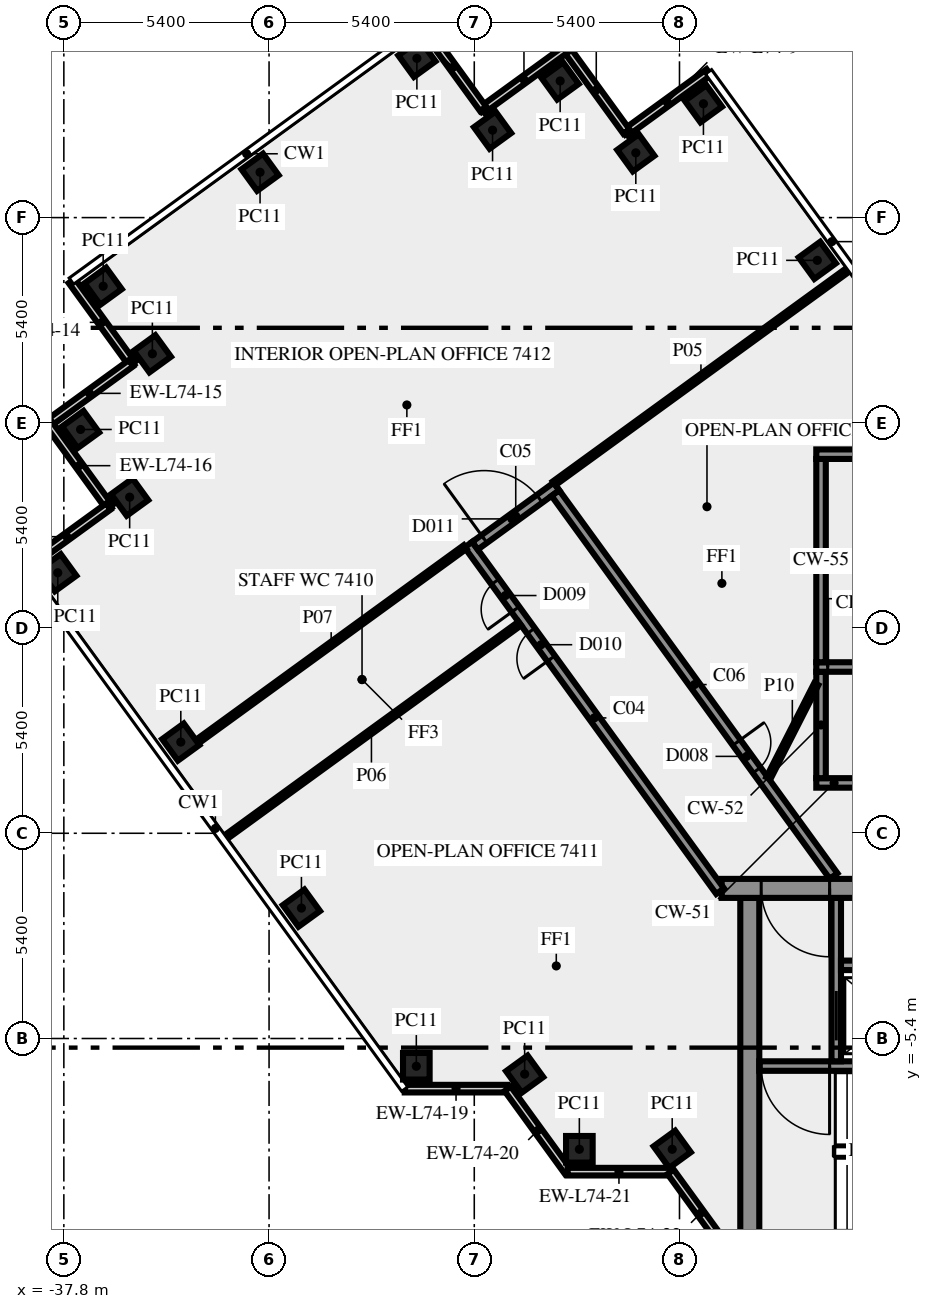
"""IFC4 building model, lengths in metres.
Left out: names, types, materials, properties, quantities, classifications, styles, units other than length and angle.
Written with IfcOpenShell. Run it as: python <this file> out.ifc"""

import sys

from ifc_helpers import new_model, si_unit, direction, frame, frame_2d, origin, origin_2d, place, context, subcontext, project, spatial, rectangle, extrude, element, fill, save


model = new_model("IFC4")
c1 = context("Model", 3, precision=1e-05, world=origin(), true_north=direction((0.0, 1.0)))
c2 = subcontext(c1, "Body", "Model", "MODEL_VIEW")
j1 = project(units=[si_unit("LENGTHUNIT", "METRE"), si_unit("PLANEANGLEUNIT", "RADIAN")], contexts=[c1])
p1 = place(None, origin())
s1 = spatial("IfcSite", under=j1, at=p1, CompositionType="ELEMENT")
p2 = place(p1, origin())
s2 = spatial("IfcBuilding", under=s1, at=p2, CompositionType="ELEMENT")
p3 = place(p2, frame((0.0, 0.0, 319.0)))
s3 = spatial("IfcBuildingStorey", under=s2, at=p3, CompositionType="ELEMENT", Elevation=319.0)
for number, where, z_axis, x_axis in (
    (1, (-17.974, 15.075, 0.0), (0.0, 0.0, 1.0), (-0.588, 0.809, 0.0)),
    (2, (-20.97, 19.195, 0.0), (0.0, 0.0, 1.0), (-0.588, 0.809, 0.0)),
    (3, (-22.749, 17.904, 0.0), (0.0, 0.0, 1.0), (-0.588, 0.809, 0.0)),
    (4, (-24.74, 19.795, 0.0), (0.0, 0.0, 1.0), (-0.588, 0.809, 0.0)),
    (5, (-26.519, 18.5, 0.0), (0.0, 0.0, 1.0), (-0.588, 0.809, 0.0)),
    (6, (-28.51, 20.39, 0.0), (0.0, 0.0, 1.0), (-0.809, -0.588, 0.0)),
    (7, (-32.637, 17.393, 0.0), (0.0, 0.0, 1.0), (-0.809, -0.588, 0.0)),
    (8, (-36.765, 14.395, 0.0), (0.0, 0.0, 1.0), (0.588, -0.809, 0.0)),
    (9, (-35.471, 12.616, 0.0), (0.0, 0.0, 1.0), (-0.809, -0.588, 0.0)),
    (10, (-37.36, 10.625, 0.0), (0.0, 0.0, 1.0), (0.588, -0.809, 0.0)),
    (11, (-36.068, 8.844, 0.0), (0.0, 0.0, 1.0), (0.588, -0.809, 0.0)),
    (12, (-37.96, 6.855, 0.0), (0.0, 0.0, 1.0), (0.588, -0.809, 0.0)),
    (13, (-34.722, 2.4, 0.0), (0.0, 0.0, 1.0), (0.588, -0.809, 0.0)),
    (14, (-31.548, -1.969, 0.0), (0.0, 0.0, 1.0), (0.588, -0.809, 0.0)),
    (15, (-28.525, -6.13, 0.0), (0.0, 0.0, 1.0), (1.0, 0.0, 0.0)),
    (16, (-25.674, -6.337, 0.0), (0.0, 0.0, 1.0), (0.588, -0.809, 0.0)),
    (17, (-24.235, -8.315, 0.0), (0.0, 0.0, 1.0), (1.0, 0.0, 0.0)),
    (18, (-21.792, -8.315, 0.0), (0.0, 0.0, 1.0), (0.588, -0.809, 0.0)),
):
    element("IfcColumn", number, at=place(p3, frame(where, z_axis=z_axis, x_axis=x_axis)), inside=s3, PredefinedType="COLUMN", context=c2, shape_type="SweptSolid", body=[
        extrude(rectangle(XDim=0.7, YDim=0.7, at=origin_2d()), origin(), (0.0, 0.0, 1.0), 3.65),
    ])
for number, where, z_axis, x_axis in (
    (19, (-20.829, 20.025, 0.0), (0.0, 0.0, 1.0), (-0.809, -0.588, 0.0)),
    (20, (-22.996, 18.466, 0.0), (0.0, 0.0, 1.0), (-0.588, 0.809, 0.0)),
):
    element("IfcWall", number, at=place(p3, frame(where, z_axis=z_axis, x_axis=x_axis)), inside=s3, PredefinedType="SOLIDWALL", context=c2, shape_type="SweptSolid", body=[
        extrude(rectangle(XDim=2.7, YDim=0.2, at=frame_2d((1.35, 0.0))), origin(), (0.0, 0.0, 1.0), 3.65),
    ])
for number, where, z_axis, x_axis in (
    (21, (-24.6, 20.623, 0.0), (0.0, 0.0, 1.0), (-0.809, -0.588, 0.0)),
    (22, (-26.768, 19.063, 0.0), (0.0, 0.0, 1.0), (-0.588, 0.809, 0.0)),
):
    element("IfcWall", number, at=place(p3, frame(where, z_axis=z_axis, x_axis=x_axis)), inside=s3, PredefinedType="SOLIDWALL", context=c2, shape_type="SweptSolid", body=[
        extrude(rectangle(XDim=2.7, YDim=0.2, at=frame_2d((1.35, 0.0))), origin(), (0.0, 0.0, 1.0), 3.65),
    ])
for number, where, z_axis, x_axis in (
    (23, (-37.592, 14.536, 0.0), (0.0, 0.0, 1.0), (0.588, -0.809, 0.0)),
    (24, (-36.032, 12.369, 0.0), (0.0, 0.0, 1.0), (-0.809, -0.588, 0.0)),
    (25, (-38.189, 10.765, 0.0), (0.0, 0.0, 1.0), (0.588, -0.809, 0.0)),
    (26, (-36.629, 8.597, 0.0), (0.0, 0.0, 1.0), (-0.809, -0.588, 0.0)),
    (27, (-28.83, -6.719, 0.0), (0.0, 0.0, 1.0), (1.0, 0.0, 0.0)),
):
    element("IfcWall", number, at=place(p3, frame(where, z_axis=z_axis, x_axis=x_axis)), inside=s3, PredefinedType="SOLIDWALL", context=c2, shape_type="SweptSolid", body=[
        extrude(rectangle(XDim=2.7, YDim=0.2, at=frame_2d((1.35, 0.0))), origin(), (0.0, 0.0, 1.0), 3.65),
    ])
p4 = place(p3, frame((-26.12, -6.724, 0.0), z_axis=(0.0, 0.0, 1.0), x_axis=(0.587720002413, -0.809064397168, 0.0)))
e28 = element("IfcWall", 28, at=p4, inside=s3, PredefinedType="SOLIDWALL", context=c2, shape_type="SweptSolid", body=[
    extrude(rectangle(XDim=2.7, YDim=0.2, at=frame_2d((1.35, 0.0))), origin(), (0.0, 0.0, 1.0), 3.65),
])
p5 = place(p3, frame((-24.543, -8.904, 0.0), z_axis=(0.0, 0.0, 1.0), x_axis=(1.0, 0.0, 0.0)))
e29 = element("IfcWall", 29, at=p5, inside=s3, PredefinedType="SOLIDWALL", context=c2, shape_type="SweptSolid", body=[
    extrude(rectangle(XDim=2.7, YDim=0.2, at=frame_2d((1.35, 0.0))), origin(), (0.0, 0.0, 1.0), 3.65),
])
p6 = place(p3, frame((-21.833, -8.909, 0.0), z_axis=(0.0, 0.0, 1.0), x_axis=(0.587766567315, -0.809030569476, 0.0)))
e30 = element("IfcWall", 30, at=p6, inside=s3, PredefinedType="SOLIDWALL", context=c2, shape_type="SweptSolid", body=[
    extrude(rectangle(XDim=2.688, YDim=0.2, at=frame_2d((1.344, 0.0))), origin(), (0.0, 0.0, 1.0), 3.65),
])
p7 = place(p3, frame((-19.75, -10.5, 0.0), z_axis=(0.0, 0.0, 1.0), x_axis=(0.0, 1.0, 0.0)))
e31 = element("IfcWall", 31, at=p7, inside=s3, PredefinedType="SHEAR", context=c2, shape_type="SweptSolid", body=[
    extrude(rectangle(XDim=8.8, YDim=0.5, at=frame_2d((4.4, 0.0))), origin(), (0.0, 0.0, 1.0), 3.65),
])
p8 = place(p3, frame((-11.45, -6.125, 0.0), z_axis=(0.0, 0.0, 1.0), x_axis=(-1.0, 0.0, 0.0)))
e32 = element("IfcWall", 32, at=p8, inside=s3, PredefinedType="SHEAR", context=c2, shape_type="SweptSolid", body=[
    extrude(rectangle(XDim=8.05, YDim=0.25, at=frame_2d((4.025, 0.0))), origin(), (0.0, 0.0, 1.0), 3.65),
])
p9 = place(p8, frame((6.2, 0.0, 0.0)))
e33 = element("IfcOpeningElement", 33, at=p9, cuts=e32, PredefinedType="OPENING", context=c2, shape_type="SweptSolid", body=[
    extrude(rectangle(XDim=1.8, YDim=2.1, at=frame_2d((0.9, 1.05))), frame((0.0, 0.135, 0.0), z_axis=(0.0, -1.0, 0.0), x_axis=(1.0, 0.0, 0.0)), (0.0, 0.0, 1.0), 0.27),
])
p10 = place(p3, frame((-17.475, -6.0, 0.0), z_axis=(0.0, 0.0, 1.0), x_axis=(0.0, 1.0, 0.0)))
e34 = element("IfcWall", 34, at=p10, inside=s3, PredefinedType="SHEAR", context=c2, shape_type="SweptSolid", body=[
    extrude(rectangle(XDim=4.3, YDim=0.25, at=frame_2d((2.15, 0.0))), origin(), (0.0, 0.0, 1.0), 3.65),
])
p11 = place(p10, frame((0.55, 0.0, 0.0)))
e35 = element("IfcOpeningElement", 35, at=p11, cuts=e34, PredefinedType="OPENING", context=c2, shape_type="SweptSolid", body=[
    extrude(rectangle(XDim=1.3, YDim=2.1, at=frame_2d((0.65, 1.05))), frame((0.0, 0.135, 0.0), z_axis=(0.0, -1.0, 0.0), x_axis=(1.0, 0.0, 0.0)), (0.0, 0.0, 1.0), 0.27),
])
p12 = place(p3, frame((-17.35, -3.475, 0.0), z_axis=(0.0, 0.0, 1.0), x_axis=(1.0, 0.0, 0.0)))
e36 = element("IfcWall", 36, at=p12, inside=s3, PredefinedType="SHEAR", context=c2, shape_type="SweptSolid", body=[
    extrude(rectangle(XDim=3.25, YDim=0.25, at=frame_2d((1.625, 0.0))), origin(), (0.0, 0.0, 1.0), 3.65),
])
p13 = place(p3, frame((20.49, -1.45, 0.0), z_axis=(0.0, 0.0, 1.0), x_axis=(-1.0, 0.0, 0.0)))
e37 = element("IfcWall", 37, at=p13, inside=s3, PredefinedType="SHEAR", context=c2, shape_type="SweptSolid", body=[
    extrude(rectangle(XDim=40.98, YDim=0.5, at=frame_2d((20.49, 0.0))), origin(), (0.0, 0.0, 1.0), 3.65),
])
p14 = place(p13, frame((38.14, 0.0, 0.0)))
e38 = element("IfcOpeningElement", 38, at=p14, cuts=e37, PredefinedType="OPENING", context=c2, shape_type="SweptSolid", body=[
    extrude(rectangle(XDim=1.8, YDim=2.1, at=frame_2d((0.9, 1.05))), frame((0.0, 0.26, 0.0), z_axis=(0.0, -1.0, 0.0), x_axis=(1.0, 0.0, 0.0)), (0.0, 0.0, 1.0), 0.52),
])
p15 = place(p13, frame((35.89, 0.0, 0.0)))
e39 = element("IfcOpeningElement", 39, at=p15, cuts=e37, PredefinedType="OPENING", context=c2, shape_type="SweptSolid", body=[
    extrude(rectangle(XDim=0.9, YDim=2.1, at=frame_2d((0.45, 1.05))), frame((0.0, 0.26, 0.0), z_axis=(0.0, -1.0, 0.0), x_axis=(1.0, 0.0, 0.0)), (0.0, 0.0, 1.0), 0.52),
])
p16 = place(p13, frame((32.94, 0.0, 0.0)))
e40 = element("IfcOpeningElement", 40, at=p16, cuts=e37, PredefinedType="OPENING", context=c2, shape_type="SweptSolid", body=[
    extrude(rectangle(XDim=0.9, YDim=2.1, at=frame_2d((0.45, 1.05))), frame((0.0, 0.26, 0.0), z_axis=(0.0, -1.0, 0.0), x_axis=(1.0, 0.0, 0.0)), (0.0, 0.0, 1.0), 0.52),
])
p17 = place(p13, frame((31.015, 0.0, 0.0)))
e41 = element("IfcOpeningElement", 41, at=p17, cuts=e37, PredefinedType="OPENING", context=c2, shape_type="SweptSolid", body=[
    extrude(rectangle(XDim=0.8, YDim=2.1, at=frame_2d((0.4, 1.05))), frame((0.0, 0.26, 0.0), z_axis=(0.0, -1.0, 0.0), x_axis=(1.0, 0.0, 0.0)), (0.0, 0.0, 1.0), 0.52),
])
p18 = place(p13, frame((24.765, 0.0, 0.0)))
e42 = element("IfcOpeningElement", 42, at=p18, cuts=e37, PredefinedType="OPENING", context=c2, shape_type="SweptSolid", body=[
    extrude(rectangle(XDim=0.8, YDim=2.1, at=frame_2d((0.4, 1.05))), frame((0.0, 0.26, 0.0), z_axis=(0.0, -1.0, 0.0), x_axis=(1.0, 0.0, 0.0)), (0.0, 0.0, 1.0), 0.52),
])
p19 = place(p13, frame((21.765, 0.0, 0.0)))
e43 = element("IfcOpeningElement", 43, at=p19, cuts=e37, PredefinedType="OPENING", context=c2, shape_type="SweptSolid", body=[
    extrude(rectangle(XDim=2.0, YDim=2.1, at=frame_2d((1.0, 1.05))), frame((0.0, 0.26, 0.0), z_axis=(0.0, -1.0, 0.0), x_axis=(1.0, 0.0, 0.0)), (0.0, 0.0, 1.0), 0.52),
])
p20 = place(p13, frame((15.103, 0.0, 0.0)))
e44 = element("IfcOpeningElement", 44, at=p20, cuts=e37, PredefinedType="OPENING", context=c2, shape_type="SweptSolid", body=[
    extrude(rectangle(XDim=0.9, YDim=2.1, at=frame_2d((0.45, 1.05))), frame((0.0, 0.26, 0.0), z_axis=(0.0, -1.0, 0.0), x_axis=(1.0, 0.0, 0.0)), (0.0, 0.0, 1.0), 0.52),
])
p21 = place(p13, frame((13.04, 0.0, 0.0)))
e45 = element("IfcOpeningElement", 45, at=p21, cuts=e37, PredefinedType="OPENING", context=c2, shape_type="SweptSolid", body=[
    extrude(rectangle(XDim=0.9, YDim=2.1, at=frame_2d((0.45, 1.05))), frame((0.0, 0.26, 0.0), z_axis=(0.0, -1.0, 0.0), x_axis=(1.0, 0.0, 0.0)), (0.0, 0.0, 1.0), 0.52),
])
p22 = place(p13, frame((10.177, 0.0, 0.0)))
e46 = element("IfcOpeningElement", 46, at=p22, cuts=e37, PredefinedType="OPENING", context=c2, shape_type="SweptSolid", body=[
    extrude(rectangle(XDim=0.9, YDim=2.1, at=frame_2d((0.45, 1.05))), frame((0.0, 0.26, 0.0), z_axis=(0.0, -1.0, 0.0), x_axis=(1.0, 0.0, 0.0)), (0.0, 0.0, 1.0), 0.52),
])
p23 = place(p13, frame((7.14, 0.0, 0.0)))
e47 = element("IfcOpeningElement", 47, at=p23, cuts=e37, PredefinedType="OPENING", context=c2, shape_type="SweptSolid", body=[
    extrude(rectangle(XDim=0.9, YDim=2.1, at=frame_2d((0.45, 1.05))), frame((0.0, 0.26, 0.0), z_axis=(0.0, -1.0, 0.0), x_axis=(1.0, 0.0, 0.0)), (0.0, 0.0, 1.0), 0.52),
])
p24 = place(p13, frame((5.028, 0.0, 0.0)))
e48 = element("IfcOpeningElement", 48, at=p24, cuts=e37, PredefinedType="OPENING", context=c2, shape_type="SweptSolid", body=[
    extrude(rectangle(XDim=0.8, YDim=2.1, at=frame_2d((0.4, 1.05))), frame((0.0, 0.26, 0.0), z_axis=(0.0, -1.0, 0.0), x_axis=(1.0, 0.0, 0.0)), (0.0, 0.0, 1.0), 0.52),
])
p25 = place(p13, frame((3.452, 0.0, 0.0)))
e49 = element("IfcOpeningElement", 49, at=p25, cuts=e37, PredefinedType="OPENING", context=c2, shape_type="SweptSolid", body=[
    extrude(rectangle(XDim=0.8, YDim=2.1, at=frame_2d((0.4, 1.05))), frame((0.0, 0.26, 0.0), z_axis=(0.0, -1.0, 0.0), x_axis=(1.0, 0.0, 0.0)), (0.0, 0.0, 1.0), 0.52),
])
p26 = place(p13, frame((1.04, 0.0, 0.0)))
e50 = element("IfcOpeningElement", 50, at=p26, cuts=e37, PredefinedType="OPENING", context=c2, shape_type="SweptSolid", body=[
    extrude(rectangle(XDim=1.8, YDim=2.1, at=frame_2d((0.9, 1.05))), frame((0.0, 0.26, 0.0), z_axis=(0.0, -1.0, 0.0), x_axis=(1.0, 0.0, 0.0)), (0.0, 0.0, 1.0), 0.52),
])
p27 = place(p3, frame((-18.0, 1.325, 0.0), z_axis=(0.0, 0.0, 1.0), x_axis=(1.0, 0.0, 0.0)))
e51 = element("IfcWall", 51, at=p27, inside=s3, PredefinedType="SHEAR", context=c2, shape_type="SweptSolid", body=[
    extrude(rectangle(XDim=3.9, YDim=0.25, at=frame_2d((1.95, 0.0))), origin(), (0.0, 0.0, 1.0), 3.65),
])
p28 = place(p27, frame((1.1, 0.0, 0.0)))
e52 = element("IfcOpeningElement", 52, at=p28, cuts=e51, PredefinedType="OPENING", context=c2, shape_type="SweptSolid", body=[
    extrude(rectangle(XDim=1.8, YDim=2.1, at=frame_2d((0.9, 1.05))), frame((0.0, 0.135, 0.0), z_axis=(0.0, -1.0, 0.0), x_axis=(1.0, 0.0, 0.0)), (0.0, 0.0, 1.0), 0.27),
])
p29 = place(p3, frame((-17.875, 1.45, 0.0), z_axis=(0.0, 0.0, 1.0), x_axis=(0.0, 1.0, 0.0)))
e53 = element("IfcWall", 53, at=p29, inside=s3, PredefinedType="SHEAR", context=c2, shape_type="SweptSolid", body=[
    extrude(rectangle(XDim=2.8, YDim=0.25, at=frame_2d((1.4, 0.0))), origin(), (0.0, 0.0, 1.0), 3.65),
])
p30 = place(p3, frame((-18.0, 4.375, 0.0), z_axis=(0.0, 0.0, 1.0), x_axis=(1.0, 0.0, 0.0)))
e54 = element("IfcWall", 54, at=p30, inside=s3, PredefinedType="SHEAR", context=c2, shape_type="SweptSolid", body=[
    extrude(rectangle(XDim=10.5, YDim=0.25, at=frame_2d((5.25, 0.0))), origin(), (0.0, 0.0, 1.0), 3.65),
])
p31 = place(p30, frame((0.3, 0.0, 0.0)))
e55 = element("IfcOpeningElement", 55, at=p31, cuts=e54, PredefinedType="OPENING", context=c2, shape_type="SweptSolid", body=[
    extrude(rectangle(XDim=1.8, YDim=2.1, at=frame_2d((0.9, 1.05))), frame((0.0, 0.135, 0.0), z_axis=(0.0, -1.0, 0.0), x_axis=(1.0, 0.0, 0.0)), (0.0, 0.0, 1.0), 0.27),
])
p32 = place(p3, frame((-17.875, 4.5, 0.0), z_axis=(0.0, 0.0, 1.0), x_axis=(0.0, 1.0, 0.0)))
e56 = element("IfcWall", 56, at=p32, inside=s3, PredefinedType="SHEAR", context=c2, shape_type="SweptSolid", body=[
    extrude(rectangle(XDim=5.35, YDim=0.25, at=frame_2d((2.675, 0.0))), origin(), (0.0, 0.0, 1.0), 3.65),
])
p33 = place(p3, frame((-18.0, 9.975, 0.0), z_axis=(0.0, 0.0, 1.0), x_axis=(1.0, 0.0, 0.0)))
e57 = element("IfcWall", 57, at=p33, inside=s3, PredefinedType="SHEAR", context=c2, shape_type="SweptSolid", body=[
    extrude(rectangle(XDim=10.5, YDim=0.25, at=frame_2d((5.25, 0.0))), origin(), (0.0, 0.0, 1.0), 3.65),
])
p34 = place(p33, frame((4.5, 0.0, 1.0)))
e58 = element("IfcOpeningElement", 58, at=p34, cuts=e57, PredefinedType="OPENING", context=c2, shape_type="SweptSolid", body=[
    extrude(rectangle(XDim=1.2, YDim=1.2, at=frame_2d((0.6, 0.6))), frame((0.0, 0.135, 0.0), z_axis=(0.0, -1.0, 0.0), x_axis=(1.0, 0.0, 0.0)), (0.0, 0.0, 1.0), 0.27),
])
p35 = place(p3, frame((-20.531, -1.523, 0.0), z_axis=(0.0, 0.0, 1.0), x_axis=(-0.587782646447, 0.809018887626, 0.0)))
e59 = element("IfcWall", 59, at=p35, inside=s3, PredefinedType="SOLIDWALL", context=c2, shape_type="SweptSolid", body=[
    extrude(rectangle(XDim=11.27, YDim=0.25, at=frame_2d((5.635, 0.0))), origin(), (0.0, 0.0, 1.0), 3.65),
])
p36 = place(p35, frame((7.566, 0.0, 0.0)))
e60 = element("IfcOpeningElement", 60, at=p36, cuts=e59, PredefinedType="OPENING", context=c2, shape_type="SweptSolid", body=[
    extrude(rectangle(XDim=0.9, YDim=2.1, at=frame_2d((0.45, 1.05))), frame((0.0, 0.135, 0.0), z_axis=(0.0, -1.0, 0.0), x_axis=(1.0, 0.0, 0.0)), (0.0, 0.0, 1.0), 0.27),
])
p37 = place(p35, frame((9.165, 0.0, 0.0)))
e61 = element("IfcOpeningElement", 61, at=p37, cuts=e59, PredefinedType="OPENING", context=c2, shape_type="SweptSolid", body=[
    extrude(rectangle(XDim=0.9, YDim=2.1, at=frame_2d((0.45, 1.05))), frame((0.0, 0.135, 0.0), z_axis=(0.0, -1.0, 0.0), x_axis=(1.0, 0.0, 0.0)), (0.0, 0.0, 1.0), 0.27),
])
p38 = place(p3, frame((-26.981, 7.567, 0.0), z_axis=(0.0, 0.0, 1.0), x_axis=(0.809038743598, 0.587755315891, 0.0)))
e62 = element("IfcWall", 62, at=p38, inside=s3, PredefinedType="SOLIDWALL", context=c2, shape_type="SweptSolid", body=[
    extrude(rectangle(XDim=2.65, YDim=0.25, at=frame_2d((1.325, 0.0))), origin(), (0.0, 0.0, 1.0), 3.65),
])
p39 = place(p38, frame((0.3, 0.0, 0.0)))
e63 = element("IfcOpeningElement", 63, at=p39, cuts=e62, PredefinedType="OPENING", context=c2, shape_type="SweptSolid", body=[
    extrude(rectangle(XDim=1.8, YDim=2.1, at=frame_2d((0.9, 1.05))), frame((0.0, 0.135, 0.0), z_axis=(0.0, -1.0, 0.0), x_axis=(1.0, 0.0, 0.0)), (0.0, 0.0, 1.0), 0.27),
])
p40 = place(p3, frame((-24.865, 8.95, 0.0), z_axis=(0.0, 0.0, 1.0), x_axis=(0.587791617212, -0.809012369952, 0.0)))
e64 = element("IfcWall", 64, at=p40, inside=s3, PredefinedType="SOLIDWALL", context=c2, shape_type="SweptSolid", body=[
    extrude(rectangle(XDim=12.453, YDim=0.25, at=frame_2d((6.227, 0.0))), origin(), (0.0, 0.0, 1.0), 3.65),
])
p41 = place(p40, frame((8.112, 0.0, 0.0)))
e65 = element("IfcOpeningElement", 65, at=p41, cuts=e64, PredefinedType="OPENING", context=c2, shape_type="SweptSolid", body=[
    extrude(rectangle(XDim=0.9, YDim=2.1, at=frame_2d((0.45, 1.05))), frame((0.0, 0.135, 0.0), z_axis=(0.0, -1.0, 0.0), x_axis=(1.0, 0.0, 0.0)), (0.0, 0.0, 1.0), 0.27),
])
p42 = place(p3, frame((-17.172, 14.823, 0.0), z_axis=(0.0, 0.0, 1.0), x_axis=(-0.809013490065, -0.587790075531, 0.0)))
e66 = element("IfcWall", 66, at=p42, inside=s3, PredefinedType="PARTITIONING", context=c2, shape_type="SweptSolid", body=[
    extrude(rectangle(XDim=9.549, YDim=0.12, at=frame_2d((4.775, 0.0))), origin(), (0.0, 0.0, 1.0), 2.95),
])
p43 = place(p3, frame((-25.802, 5.519, 0.0), z_axis=(0.0, 0.0, 1.0), x_axis=(-0.808994179369, -0.587816653173, 0.0)))
e67 = element("IfcWall", 67, at=p43, inside=s3, PredefinedType="PARTITIONING", context=c2, shape_type="SweptSolid", body=[
    extrude(rectangle(XDim=9.651, YDim=0.12, at=frame_2d((4.825, 0.0))), origin(), (0.0, 0.0, 1.0), 2.95),
])
p44 = place(p3, frame((-34.291, 2.41, 0.0), z_axis=(0.0, 0.0, 1.0), x_axis=(0.809027940177, 0.587770186393, 0.0)))
e68 = element("IfcWall", 68, at=p44, inside=s3, PredefinedType="PARTITIONING", context=c2, shape_type="SweptSolid", body=[
    extrude(rectangle(XDim=8.715, YDim=0.12, at=frame_2d((4.357, 0.0))), origin(), (0.0, 0.0, 1.0), 3.65),
])
p45 = place(p3, frame((-19.261, 1.45, 0.0), z_axis=(0.0, 0.0, 1.0), x_axis=(0.453950796792, 0.891026752736, 0.0)))
e69 = element("IfcWall", 69, at=p45, inside=s3, PredefinedType="PARTITIONING", context=c2, shape_type="SweptSolid", body=[
    extrude(rectangle(XDim=2.778, YDim=0.12, at=frame_2d((1.389, 0.0))), origin(), (0.0, 0.0, 1.0), 3.65),
])
p46 = place(p9, origin())
e70 = element("IfcDoor", 70, at=p46, inside=s3, OperationType="DOUBLE_DOOR_SINGLE_SWING", PredefinedType="DOOR", context=c2, shape_type="SweptSolid", body=[
    extrude(rectangle(XDim=1.8, YDim=2.1, at=frame_2d((0.9, 1.05))), frame((0.0, 0.025, 0.0), z_axis=(0.0, -1.0, 0.0), x_axis=(1.0, 0.0, 0.0)), (0.0, 0.0, 1.0), 0.05),
])
fill(e33, e70)
p47 = place(p11, origin())
e71 = element("IfcDoor", 71, at=p47, inside=s3, OperationType="DOUBLE_DOOR_SLIDING", PredefinedType="DOOR", context=c2, shape_type="SweptSolid", body=[
    extrude(rectangle(XDim=1.3, YDim=2.1, at=frame_2d((0.65, 1.05))), frame((0.0, 0.025, 0.0), z_axis=(0.0, -1.0, 0.0), x_axis=(1.0, 0.0, 0.0)), (0.0, 0.0, 1.0), 0.05),
])
fill(e35, e71)
p48 = place(p14, origin())
e72 = element("IfcDoor", 72, at=p48, inside=s3, OperationType="DOUBLE_DOOR_SINGLE_SWING", PredefinedType="DOOR", context=c2, shape_type="SweptSolid", body=[
    extrude(rectangle(XDim=1.8, YDim=2.1, at=frame_2d((0.9, 1.05))), frame((0.0, 0.025, 0.0), z_axis=(0.0, -1.0, 0.0), x_axis=(1.0, 0.0, 0.0)), (0.0, 0.0, 1.0), 0.05),
])
fill(e38, e72)
p49 = place(p31, origin())
e73 = element("IfcDoor", 73, at=p49, inside=s3, OperationType="DOUBLE_DOOR_SINGLE_SWING", PredefinedType="DOOR", context=c2, shape_type="SweptSolid", body=[
    extrude(rectangle(XDim=1.8, YDim=2.1, at=frame_2d((0.9, 1.05))), frame((0.0, 0.025, 0.0), z_axis=(0.0, -1.0, 0.0), x_axis=(1.0, 0.0, 0.0)), (0.0, 0.0, 1.0), 0.05),
])
fill(e55, e73)
p50 = place(p41, origin())
e74 = element("IfcDoor", 74, at=p50, inside=s3, OperationType="SINGLE_SWING_RIGHT", PredefinedType="DOOR", context=c2, shape_type="SweptSolid", body=[
    extrude(rectangle(XDim=0.9, YDim=2.1, at=frame_2d((0.45, 1.05))), frame((0.0, 0.025, 0.0), z_axis=(0.0, -1.0, 0.0), x_axis=(1.0, 0.0, 0.0)), (0.0, 0.0, 1.0), 0.05),
])
fill(e65, e74)
p51 = place(p36, origin())
e75 = element("IfcDoor", 75, at=p51, inside=s3, OperationType="SINGLE_SWING_RIGHT", PredefinedType="DOOR", context=c2, shape_type="SweptSolid", body=[
    extrude(rectangle(XDim=0.9, YDim=2.1, at=frame_2d((0.45, 1.05))), frame((0.0, 0.025, 0.0), z_axis=(0.0, -1.0, 0.0), x_axis=(1.0, 0.0, 0.0)), (0.0, 0.0, 1.0), 0.05),
])
fill(e60, e75)
p52 = place(p39, origin())
e76 = element("IfcDoor", 76, at=p52, inside=s3, OperationType="DOUBLE_DOOR_SINGLE_SWING", PredefinedType="DOOR", context=c2, shape_type="SweptSolid", body=[
    extrude(rectangle(XDim=1.8, YDim=2.1, at=frame_2d((0.9, 1.05))), frame((0.0, 0.025, 0.0), z_axis=(0.0, -1.0, 0.0), x_axis=(1.0, 0.0, 0.0)), (0.0, 0.0, 1.0), 0.05),
])
fill(e63, e76)
p53 = place(p37, origin())
e77 = element("IfcDoor", 77, at=p53, inside=s3, OperationType="SINGLE_SWING_LEFT", PredefinedType="DOOR", context=c2, shape_type="SweptSolid", body=[
    extrude(rectangle(XDim=0.9, YDim=2.1, at=frame_2d((0.45, 1.05))), frame((0.0, 0.025, 0.0), z_axis=(0.0, -1.0, 0.0), x_axis=(1.0, 0.0, 0.0)), (0.0, 0.0, 1.0), 0.05),
])
fill(e61, e77)
save(model, sys.argv[1])
